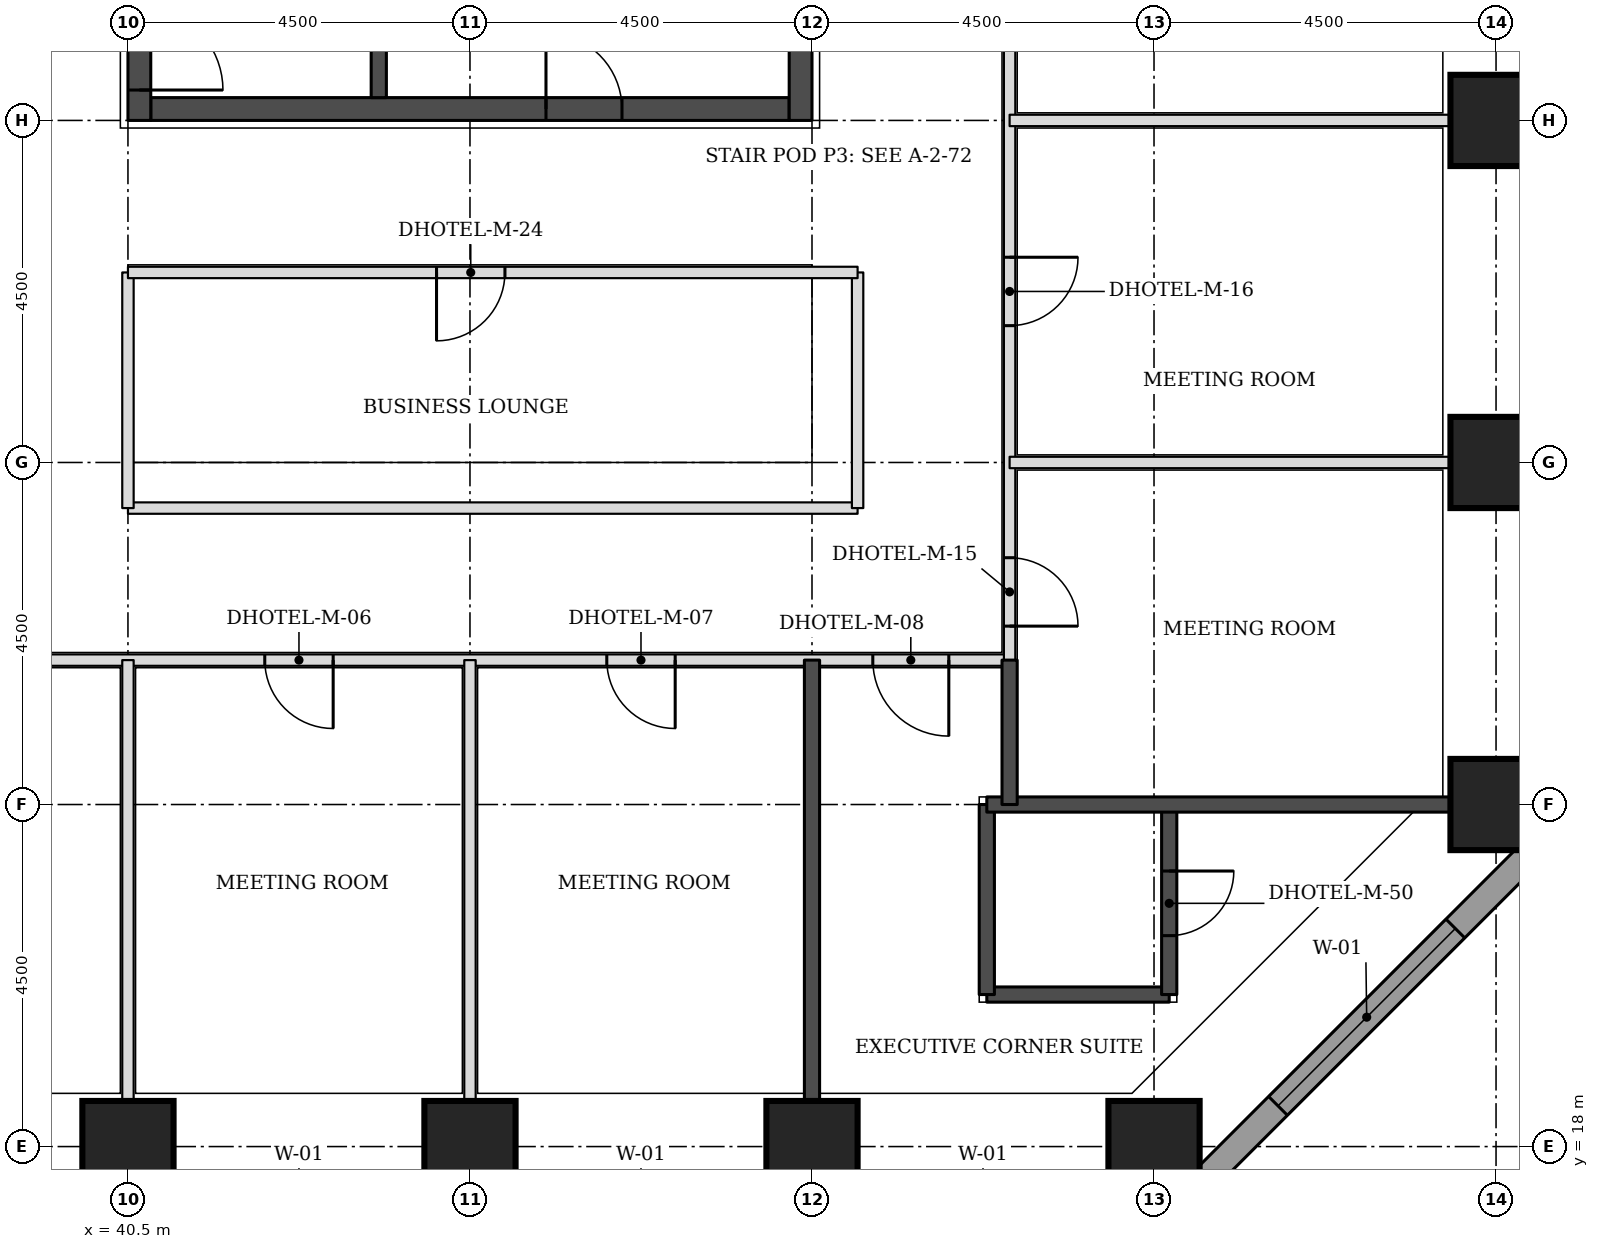
"""IFC4 building model, lengths in metres.
Left out: names, types, materials, properties, quantities, classifications, styles, units other than length and angle.
Written with IfcOpenShell. Run it as: python <this file> out.ifc"""

import sys

from ifc_helpers import new_model, si_unit, direction, frame, frame_2d, origin, origin_2d, place, context, subcontext, project, spatial, rectangle, extrude, element, fill, save


model = new_model("IFC4")
c1 = context("Model", 3, precision=1e-05, world=origin(), true_north=direction((0.0, 1.0)))
c2 = subcontext(c1, "Body", "Model", "MODEL_VIEW")
j1 = project(units=[si_unit("LENGTHUNIT", "METRE"), si_unit("PLANEANGLEUNIT", "RADIAN")], contexts=[c1])
p1 = place(None, origin())
s1 = spatial("IfcSite", under=j1, at=p1, CompositionType="ELEMENT")
p2 = place(p1, origin())
s2 = spatial("IfcBuilding", under=s1, at=p2, CompositionType="ELEMENT")
p3 = place(p2, frame((0.0, 0.0, 23.1)))
s3 = spatial("IfcBuildingStorey", under=s2, at=p3, CompositionType="ELEMENT", Elevation=23.1)
for number, where, z_axis, x_axis in (
    (1, (40.5, 18.0, 0.0), (0.0, 0.0, 1.0), (1.0, 0.0, 0.0)),
    (2, (45.0, 18.0, 0.0), (0.0, 0.0, 1.0), (1.0, 0.0, 0.0)),
    (3, (49.5, 18.0, 0.0), (0.0, 0.0, 1.0), (1.0, 0.0, 0.0)),
    (4, (54.0, 18.0, 0.0), (0.0, 0.0, 1.0), (1.0, 0.0, 0.0)),
    (5, (58.5, 22.5, 0.0), (0.0, 0.0, 1.0), (1.0, 0.0, 0.0)),
    (6, (58.5, 27.0, 0.0), (0.0, 0.0, 1.0), (1.0, 0.0, 0.0)),
    (7, (58.5, 31.5, 0.0), (0.0, 0.0, 1.0), (1.0, 0.0, 0.0)),
):
    element("IfcColumn", number, at=place(p3, frame(where, z_axis=z_axis, x_axis=x_axis)), inside=s3, PredefinedType="COLUMN", context=c2, shape_type="SweptSolid", body=[
        extrude(rectangle(XDim=1.2, YDim=1.2, at=origin_2d()), origin(), (0.0, 0.0, 1.0), 3.3),
    ])
p4 = place(p3, frame((40.8, 31.65, 0.0), z_axis=(0.0, 0.0, 1.0), x_axis=(1.0, 0.0, 0.0)))
e8 = element("IfcWall", 8, at=p4, inside=s3, PredefinedType="SHEAR", context=c2, shape_type="SweptSolid", body=[
    extrude(rectangle(XDim=8.4, YDim=0.3, at=frame_2d((4.2, 0.0))), origin(), (0.0, 0.0, 1.0), 3.3),
])
p5 = place(p4, frame((5.2, 0.0, 0.0)))
e9 = element("IfcOpeningElement", 9, at=p5, cuts=e8, PredefinedType="OPENING", context=c2, shape_type="SweptSolid", body=[
    extrude(rectangle(XDim=1.0, YDim=2.1, at=frame_2d((0.5, 1.05))), frame((0.0, 0.16, 0.0), z_axis=(0.0, -1.0, 0.0), x_axis=(1.0, 0.0, 0.0)), (0.0, 0.0, 1.0), 0.32),
])
p6 = place(p3, frame((40.65, 31.5, 0.0), z_axis=(0.0, 0.0, 1.0), x_axis=(0.0, 1.0, 0.0)))
e10 = element("IfcWall", 10, at=p6, inside=s3, PredefinedType="SHEAR", context=c2, shape_type="SweptSolid", body=[
    extrude(rectangle(XDim=9.0, YDim=0.3, at=frame_2d((4.5, 0.0))), origin(), (0.0, 0.0, 1.0), 3.3),
])
p7 = place(p6, frame((0.4, 0.0, 0.0)))
e11 = element("IfcOpeningElement", 11, at=p7, cuts=e10, PredefinedType="OPENING", context=c2, shape_type="SweptSolid", body=[
    extrude(rectangle(XDim=1.1, YDim=2.1, at=frame_2d((0.55, 1.05))), frame((0.0, 0.16, 0.0), z_axis=(0.0, -1.0, 0.0), x_axis=(1.0, 0.0, 0.0)), (0.0, 0.0, 1.0), 0.32),
])
p8 = place(p3, frame((49.35, 31.5, 0.0), z_axis=(0.0, 0.0, 1.0), x_axis=(0.0, 1.0, 0.0)))
e12 = element("IfcWall", 12, at=p8, inside=s3, PredefinedType="SHEAR", context=c2, shape_type="SweptSolid", body=[
    extrude(rectangle(XDim=9.0, YDim=0.3, at=frame_2d((4.5, 0.0))), origin(), (0.0, 0.0, 1.0), 3.3),
])
p9 = place(p3, frame((54.27, 17.174, 0.0), z_axis=(0.0, 0.0, 1.0), x_axis=(0.707106781187, 0.707106781187, 0.0)))
e13 = element("IfcWall", 13, at=p9, inside=s3, PredefinedType="STANDARD", context=c2, shape_type="SweptSolid", body=[
    extrude(rectangle(XDim=7.151, YDim=0.35, at=frame_2d((3.576, 0.0))), origin(), (0.0, 0.0, 1.0), 3.055),
])
p10 = place(p9, frame((1.926, 0.0, 0.8)))
e14 = element("IfcOpeningElement", 14, at=p10, cuts=e13, PredefinedType="OPENING", context=c2, shape_type="SweptSolid", body=[
    extrude(rectangle(XDim=3.3, YDim=1.5, at=frame_2d((1.65, 0.75))), frame((0.0, 0.185, 0.0), z_axis=(0.0, -1.0, 0.0), x_axis=(1.0, 0.0, 0.0)), (0.0, 0.0, 1.0), 0.37),
])
p11 = place(p3, frame((19.9, 24.4, 0.0), z_axis=(0.0, 0.0, 1.0), x_axis=(1.0, 0.0, 0.0)))
e15 = element("IfcWall", 15, at=p11, inside=s3, PredefinedType="PARTITIONING", context=c2, shape_type="SweptSolid", body=[
    extrude(rectangle(XDim=32.2, YDim=0.15, at=frame_2d((16.1, 0.0))), origin(), (0.0, 0.0, 1.0), 3.08),
])
p12 = place(p11, frame((4.4, 0.0, 0.0)))
e16 = element("IfcOpeningElement", 16, at=p12, cuts=e15, PredefinedType="OPENING", context=c2, shape_type="SweptSolid", body=[
    extrude(rectangle(XDim=0.9, YDim=2.1, at=frame_2d((0.45, 1.05))), frame((0.0, 0.085, 0.0), z_axis=(0.0, -1.0, 0.0), x_axis=(1.0, 0.0, 0.0)), (0.0, 0.0, 1.0), 0.17),
])
p13 = place(p11, frame((8.9, 0.0, 0.0)))
e17 = element("IfcOpeningElement", 17, at=p13, cuts=e15, PredefinedType="OPENING", context=c2, shape_type="SweptSolid", body=[
    extrude(rectangle(XDim=0.9, YDim=2.1, at=frame_2d((0.45, 1.05))), frame((0.0, 0.085, 0.0), z_axis=(0.0, -1.0, 0.0), x_axis=(1.0, 0.0, 0.0)), (0.0, 0.0, 1.0), 0.17),
])
p14 = place(p11, frame((13.4, 0.0, 0.0)))
e18 = element("IfcOpeningElement", 18, at=p14, cuts=e15, PredefinedType="OPENING", context=c2, shape_type="SweptSolid", body=[
    extrude(rectangle(XDim=0.9, YDim=2.1, at=frame_2d((0.45, 1.05))), frame((0.0, 0.085, 0.0), z_axis=(0.0, -1.0, 0.0), x_axis=(1.0, 0.0, 0.0)), (0.0, 0.0, 1.0), 0.17),
])
p15 = place(p11, frame((17.9, 0.0, 0.0)))
e19 = element("IfcOpeningElement", 19, at=p15, cuts=e15, PredefinedType="OPENING", context=c2, shape_type="SweptSolid", body=[
    extrude(rectangle(XDim=0.9, YDim=2.1, at=frame_2d((0.45, 1.05))), frame((0.0, 0.085, 0.0), z_axis=(0.0, -1.0, 0.0), x_axis=(1.0, 0.0, 0.0)), (0.0, 0.0, 1.0), 0.17),
])
p16 = place(p11, frame((22.4, 0.0, 0.0)))
e20 = element("IfcOpeningElement", 20, at=p16, cuts=e15, PredefinedType="OPENING", context=c2, shape_type="SweptSolid", body=[
    extrude(rectangle(XDim=0.9, YDim=2.1, at=frame_2d((0.45, 1.05))), frame((0.0, 0.085, 0.0), z_axis=(0.0, -1.0, 0.0), x_axis=(1.0, 0.0, 0.0)), (0.0, 0.0, 1.0), 0.17),
])
p17 = place(p11, frame((26.9, 0.0, 0.0)))
e21 = element("IfcOpeningElement", 21, at=p17, cuts=e15, PredefinedType="OPENING", context=c2, shape_type="SweptSolid", body=[
    extrude(rectangle(XDim=0.9, YDim=2.1, at=frame_2d((0.45, 1.05))), frame((0.0, 0.085, 0.0), z_axis=(0.0, -1.0, 0.0), x_axis=(1.0, 0.0, 0.0)), (0.0, 0.0, 1.0), 0.17),
])
p18 = place(p11, frame((0.8, 0.0, 0.0)))
e22 = element("IfcOpeningElement", 22, at=p18, cuts=e15, PredefinedType="OPENING", context=c2, shape_type="SweptSolid", body=[
    extrude(rectangle(XDim=1.0, YDim=2.1, at=frame_2d((0.5, 1.05))), frame((0.0, 0.085, 0.0), z_axis=(0.0, -1.0, 0.0), x_axis=(1.0, 0.0, 0.0)), (0.0, 0.0, 1.0), 0.17),
])
p19 = place(p11, frame((30.4, 0.0, 0.0)))
e23 = element("IfcOpeningElement", 23, at=p19, cuts=e15, PredefinedType="OPENING", context=c2, shape_type="SweptSolid", body=[
    extrude(rectangle(XDim=1.0, YDim=2.1, at=frame_2d((0.5, 1.05))), frame((0.0, 0.085, 0.0), z_axis=(0.0, -1.0, 0.0), x_axis=(1.0, 0.0, 0.0)), (0.0, 0.0, 1.0), 0.17),
])
p20 = place(p3, frame((52.1, 24.4, 0.0), z_axis=(0.0, 0.0, 1.0), x_axis=(0.0, 1.0, 0.0)))
e24 = element("IfcWall", 24, at=p20, inside=s3, PredefinedType="PARTITIONING", context=c2, shape_type="SweptSolid", body=[
    extrude(rectangle(XDim=23.1, YDim=0.15, at=frame_2d((11.55, 0.0))), origin(), (0.0, 0.0, 1.0), 3.08),
])
p21 = place(p20, frame((0.447, 0.0, 0.0)))
e25 = element("IfcOpeningElement", 25, at=p21, cuts=e24, PredefinedType="OPENING", context=c2, shape_type="SweptSolid", body=[
    extrude(rectangle(XDim=0.9, YDim=2.1, at=frame_2d((0.45, 1.05))), frame((0.0, 0.085, 0.0), z_axis=(0.0, -1.0, 0.0), x_axis=(1.0, 0.0, 0.0)), (0.0, 0.0, 1.0), 0.17),
])
p22 = place(p20, frame((4.4, 0.0, 0.0)))
e26 = element("IfcOpeningElement", 26, at=p22, cuts=e24, PredefinedType="OPENING", context=c2, shape_type="SweptSolid", body=[
    extrude(rectangle(XDim=0.9, YDim=2.1, at=frame_2d((0.45, 1.05))), frame((0.0, 0.085, 0.0), z_axis=(0.0, -1.0, 0.0), x_axis=(1.0, 0.0, 0.0)), (0.0, 0.0, 1.0), 0.17),
])
p23 = place(p20, frame((8.9, 0.0, 0.0)))
e27 = element("IfcOpeningElement", 27, at=p23, cuts=e24, PredefinedType="OPENING", context=c2, shape_type="SweptSolid", body=[
    extrude(rectangle(XDim=0.9, YDim=2.1, at=frame_2d((0.45, 1.05))), frame((0.0, 0.085, 0.0), z_axis=(0.0, -1.0, 0.0), x_axis=(1.0, 0.0, 0.0)), (0.0, 0.0, 1.0), 0.17),
])
p24 = place(p20, frame((13.4, 0.0, 0.0)))
e28 = element("IfcOpeningElement", 28, at=p24, cuts=e24, PredefinedType="OPENING", context=c2, shape_type="SweptSolid", body=[
    extrude(rectangle(XDim=0.9, YDim=2.1, at=frame_2d((0.45, 1.05))), frame((0.0, 0.085, 0.0), z_axis=(0.0, -1.0, 0.0), x_axis=(1.0, 0.0, 0.0)), (0.0, 0.0, 1.0), 0.17),
])
p25 = place(p20, frame((19.15, 0.0, 0.0)))
e29 = element("IfcOpeningElement", 29, at=p25, cuts=e24, PredefinedType="OPENING", context=c2, shape_type="SweptSolid", body=[
    extrude(rectangle(XDim=0.9, YDim=2.1, at=frame_2d((0.45, 1.05))), frame((0.0, 0.085, 0.0), z_axis=(0.0, -1.0, 0.0), x_axis=(1.0, 0.0, 0.0)), (0.0, 0.0, 1.0), 0.17),
])
p26 = place(p3, frame((40.5, 26.4, 0.0), z_axis=(0.0, 0.0, 1.0), x_axis=(1.0, 0.0, 0.0)))
e30 = element("IfcWall", 30, at=p26, inside=s3, PredefinedType="PARTITIONING", context=c2, shape_type="SweptSolid", body=[
    extrude(rectangle(XDim=9.6, YDim=0.15, at=frame_2d((4.8, 0.0))), origin(), (0.0, 0.0, 1.0), 3.08),
])
for number, where, z_axis, x_axis in (
    (31, (40.5, 26.4, 0.0), (0.0, 0.0, 1.0), (0.0, 1.0, 0.0)),
    (32, (50.1, 26.4, 0.0), (0.0, 0.0, 1.0), (0.0, 1.0, 0.0)),
):
    element("IfcWall", number, at=place(p3, frame(where, z_axis=z_axis, x_axis=x_axis)), inside=s3, PredefinedType="PARTITIONING", context=c2, shape_type="SweptSolid", body=[
        extrude(rectangle(XDim=3.1, YDim=0.15, at=frame_2d((1.55, 0.0))), origin(), (0.0, 0.0, 1.0), 3.08),
    ])
p27 = place(p3, frame((40.5, 29.5, 0.0), z_axis=(0.0, 0.0, 1.0), x_axis=(1.0, 0.0, 0.0)))
e33 = element("IfcWall", 33, at=p27, inside=s3, PredefinedType="PARTITIONING", context=c2, shape_type="SweptSolid", body=[
    extrude(rectangle(XDim=9.6, YDim=0.15, at=frame_2d((4.8, 0.0))), origin(), (0.0, 0.0, 1.0), 3.08),
])
p28 = place(p27, frame((4.06, 0.0, 0.0)))
e34 = element("IfcOpeningElement", 34, at=p28, cuts=e33, PredefinedType="OPENING", context=c2, shape_type="SweptSolid", body=[
    extrude(rectangle(XDim=0.9, YDim=2.1, at=frame_2d((0.45, 1.05))), frame((0.0, 0.085, 0.0), z_axis=(0.0, -1.0, 0.0), x_axis=(1.0, 0.0, 0.0)), (0.0, 0.0, 1.0), 0.17),
])
p29 = place(p3, frame((49.5, 18.6, 0.0), z_axis=(0.0, 0.0, 1.0), x_axis=(0.0, 1.0, 0.0)))
e35 = element("IfcWall", 35, at=p29, inside=s3, PredefinedType="SOLIDWALL", context=c2, shape_type="SweptSolid", body=[
    extrude(rectangle(XDim=5.8, YDim=0.2, at=frame_2d((2.9, 0.0))), origin(), (0.0, 0.0, 1.0), 3.08),
])
p30 = place(p3, frame((51.8, 20.0, 0.0), z_axis=(0.0, 0.0, 1.0), x_axis=(1.0, 0.0, 0.0)))
e36 = element("IfcWall", 36, at=p30, inside=s3, PredefinedType="SOLIDWALL", context=c2, shape_type="SweptSolid", body=[
    extrude(rectangle(XDim=2.4, YDim=0.2, at=frame_2d((1.2, 0.0))), origin(), (0.0, 0.0, 1.0), 3.08),
])
p31 = place(p3, frame((51.8, 20.0, 0.0), z_axis=(0.0, 0.0, 1.0), x_axis=(0.0, 1.0, 0.0)))
e37 = element("IfcWall", 37, at=p31, inside=s3, PredefinedType="SOLIDWALL", context=c2, shape_type="SweptSolid", body=[
    extrude(rectangle(XDim=2.5, YDim=0.2, at=frame_2d((1.25, 0.0))), origin(), (0.0, 0.0, 1.0), 3.08),
])
p32 = place(p3, frame((54.2, 20.0, 0.0), z_axis=(0.0, 0.0, 1.0), x_axis=(0.0, 1.0, 0.0)))
e38 = element("IfcWall", 38, at=p32, inside=s3, PredefinedType="SOLIDWALL", context=c2, shape_type="SweptSolid", body=[
    extrude(rectangle(XDim=2.5, YDim=0.2, at=frame_2d((1.25, 0.0))), origin(), (0.0, 0.0, 1.0), 3.08),
])
p33 = place(p32, frame((0.775, 0.0, 0.0)))
e39 = element("IfcOpeningElement", 39, at=p33, cuts=e38, PredefinedType="OPENING", context=c2, shape_type="SweptSolid", body=[
    extrude(rectangle(XDim=0.85, YDim=2.1, at=frame_2d((0.425, 1.05))), frame((0.0, 0.11, 0.0), z_axis=(0.0, -1.0, 0.0), x_axis=(1.0, 0.0, 0.0)), (0.0, 0.0, 1.0), 0.22),
])
p34 = place(p3, frame((51.8, 22.5, 0.0), z_axis=(0.0, 0.0, 1.0), x_axis=(1.0, 0.0, 0.0)))
e40 = element("IfcWall", 40, at=p34, inside=s3, PredefinedType="SOLIDWALL", context=c2, shape_type="SweptSolid", body=[
    extrude(rectangle(XDim=6.1, YDim=0.2, at=frame_2d((3.05, 0.0))), origin(), (0.0, 0.0, 1.0), 3.08),
])
p35 = place(p3, frame((52.1, 22.5, 0.0), z_axis=(0.0, 0.0, 1.0), x_axis=(0.0, 1.0, 0.0)))
e41 = element("IfcWall", 41, at=p35, inside=s3, PredefinedType="SOLIDWALL", context=c2, shape_type="SweptSolid", body=[
    extrude(rectangle(XDim=1.9, YDim=0.2, at=frame_2d((0.95, 0.0))), origin(), (0.0, 0.0, 1.0), 3.08),
])
for number, where, z_axis, x_axis in (
    (42, (40.5, 18.6, 0.0), (0.0, 0.0, 1.0), (0.0, 1.0, 0.0)),
    (43, (45.0, 18.6, 0.0), (0.0, 0.0, 1.0), (0.0, 1.0, 0.0)),
    (44, (52.1, 27.0, 0.0), (0.0, 0.0, 1.0), (1.0, 0.0, 0.0)),
    (45, (52.1, 31.5, 0.0), (0.0, 0.0, 1.0), (1.0, 0.0, 0.0)),
):
    element("IfcWall", number, at=place(p3, frame(where, z_axis=z_axis, x_axis=x_axis)), inside=s3, PredefinedType="PARTITIONING", context=c2, shape_type="SweptSolid", body=[
        extrude(rectangle(XDim=5.8, YDim=0.15, at=frame_2d((2.9, 0.0))), origin(), (0.0, 0.0, 1.0), 3.08),
    ])
p36 = place(p3, frame((43.8, 31.8, 0.0), z_axis=(0.0, 0.0, 1.0), x_axis=(0.0, 1.0, 0.0)))
e46 = element("IfcWall", 46, at=p36, inside=s3, PredefinedType="SOLIDWALL", context=c2, shape_type="SweptSolid", body=[
    extrude(rectangle(XDim=5.7, YDim=0.2, at=frame_2d((2.85, 0.0))), origin(), (0.0, 0.0, 1.0), 3.08),
])
p37 = place(p10, origin())
e47 = element("IfcWindow", 47, at=p37, inside=s3, PartitioningType="SINGLE_PANEL", PredefinedType="WINDOW", context=c2, shape_type="SweptSolid", body=[
    extrude(rectangle(XDim=3.3, YDim=1.5, at=frame_2d((1.65, 0.75))), frame((0.0, 0.085, 0.0), z_axis=(0.0, -1.0, 0.0), x_axis=(1.0, 0.0, 0.0)), (0.0, 0.0, 1.0), 0.06),
])
fill(e14, e47)
p38 = place(p16, frame((0.9, 0.0, 0.0), z_axis=(0.0, 0.0, 1.0), x_axis=(-1.0, 0.0, 0.0)))
e48 = element("IfcDoor", 48, at=p38, inside=s3, OperationType="SINGLE_SWING_LEFT", PredefinedType="DOOR", context=c2, shape_type="SweptSolid", body=[
    extrude(rectangle(XDim=0.9, YDim=2.1, at=frame_2d((0.45, 1.05))), frame((0.0, 0.025, 0.0), z_axis=(0.0, -1.0, 0.0), x_axis=(1.0, 0.0, 0.0)), (0.0, 0.0, 1.0), 0.05),
])
fill(e20, e48)
p39 = place(p17, frame((0.9, 0.0, 0.0), z_axis=(0.0, 0.0, 1.0), x_axis=(-1.0, 0.0, 0.0)))
e49 = element("IfcDoor", 49, at=p39, inside=s3, OperationType="SINGLE_SWING_LEFT", PredefinedType="DOOR", context=c2, shape_type="SweptSolid", body=[
    extrude(rectangle(XDim=0.9, YDim=2.1, at=frame_2d((0.45, 1.05))), frame((0.0, 0.025, 0.0), z_axis=(0.0, -1.0, 0.0), x_axis=(1.0, 0.0, 0.0)), (0.0, 0.0, 1.0), 0.05),
])
fill(e21, e49)
p40 = place(p21, frame((0.9, 0.0, 0.0), z_axis=(0.0, 0.0, 1.0), x_axis=(-1.0, 0.0, 0.0)))
e50 = element("IfcDoor", 50, at=p40, inside=s3, OperationType="SINGLE_SWING_RIGHT", PredefinedType="DOOR", context=c2, shape_type="SweptSolid", body=[
    extrude(rectangle(XDim=0.9, YDim=2.1, at=frame_2d((0.45, 1.05))), frame((0.0, 0.025, 0.0), z_axis=(0.0, -1.0, 0.0), x_axis=(1.0, 0.0, 0.0)), (0.0, 0.0, 1.0), 0.05),
])
fill(e25, e50)
p41 = place(p22, frame((0.9, 0.0, 0.0), z_axis=(0.0, 0.0, 1.0), x_axis=(-1.0, 0.0, 0.0)))
e51 = element("IfcDoor", 51, at=p41, inside=s3, OperationType="SINGLE_SWING_LEFT", PredefinedType="DOOR", context=c2, shape_type="SweptSolid", body=[
    extrude(rectangle(XDim=0.9, YDim=2.1, at=frame_2d((0.45, 1.05))), frame((0.0, 0.025, 0.0), z_axis=(0.0, -1.0, 0.0), x_axis=(1.0, 0.0, 0.0)), (0.0, 0.0, 1.0), 0.05),
])
fill(e26, e51)
p42 = place(p19, frame((1.0, 0.0, 0.0), z_axis=(0.0, 0.0, 1.0), x_axis=(-1.0, 0.0, 0.0)))
e52 = element("IfcDoor", 52, at=p42, inside=s3, OperationType="SINGLE_SWING_LEFT", PredefinedType="DOOR", context=c2, shape_type="SweptSolid", body=[
    extrude(rectangle(XDim=1.0, YDim=2.1, at=frame_2d((0.5, 1.05))), frame((0.0, 0.025, 0.0), z_axis=(0.0, -1.0, 0.0), x_axis=(1.0, 0.0, 0.0)), (0.0, 0.0, 1.0), 0.05),
])
fill(e23, e52)
p43 = place(p33, frame((0.85, 0.0, 0.0), z_axis=(0.0, 0.0, 1.0), x_axis=(-1.0, 0.0, 0.0)))
e53 = element("IfcDoor", 53, at=p43, inside=s3, OperationType="SINGLE_SWING_LEFT", PredefinedType="DOOR", context=c2, shape_type="SweptSolid", body=[
    extrude(rectangle(XDim=0.85, YDim=2.1, at=frame_2d((0.425, 1.05))), frame((0.0, 0.025, 0.0), z_axis=(0.0, -1.0, 0.0), x_axis=(1.0, 0.0, 0.0)), (0.0, 0.0, 1.0), 0.05),
])
fill(e39, e53)
p44 = place(p28, frame((0.9, 0.0, 0.0), z_axis=(0.0, 0.0, 1.0), x_axis=(-1.0, 0.0, 0.0)))
e54 = element("IfcDoor", 54, at=p44, inside=s3, OperationType="SINGLE_SWING_RIGHT", PredefinedType="DOOR", context=c2, shape_type="SweptSolid", body=[
    extrude(rectangle(XDim=0.9, YDim=2.1, at=frame_2d((0.45, 1.05))), frame((0.0, 0.025, 0.0), z_axis=(0.0, -1.0, 0.0), x_axis=(1.0, 0.0, 0.0)), (0.0, 0.0, 1.0), 0.05),
])
fill(e34, e54)
p45 = place(p7, frame((1.1, 0.0, 0.0), z_axis=(0.0, 0.0, 1.0), x_axis=(-1.0, 0.0, 0.0)))
e55 = element("IfcDoor", 55, at=p45, inside=s3, OperationType="SINGLE_SWING_RIGHT", PredefinedType="DOOR", context=c2, shape_type="SweptSolid", body=[
    extrude(rectangle(XDim=1.1, YDim=2.1, at=frame_2d((0.55, 1.05))), frame((0.0, 0.025, 0.0), z_axis=(0.0, -1.0, 0.0), x_axis=(1.0, 0.0, 0.0)), (0.0, 0.0, 1.0), 0.05),
])
fill(e11, e55)
p46 = place(p5, origin())
e56 = element("IfcDoor", 56, at=p46, inside=s3, OperationType="SINGLE_SWING_LEFT", PredefinedType="DOOR", context=c2, shape_type="SweptSolid", body=[
    extrude(rectangle(XDim=1.0, YDim=2.1, at=frame_2d((0.5, 1.05))), frame((0.0, 0.025, 0.0), z_axis=(0.0, -1.0, 0.0), x_axis=(1.0, 0.0, 0.0)), (0.0, 0.0, 1.0), 0.05),
])
fill(e9, e56)
save(model, sys.argv[1])
